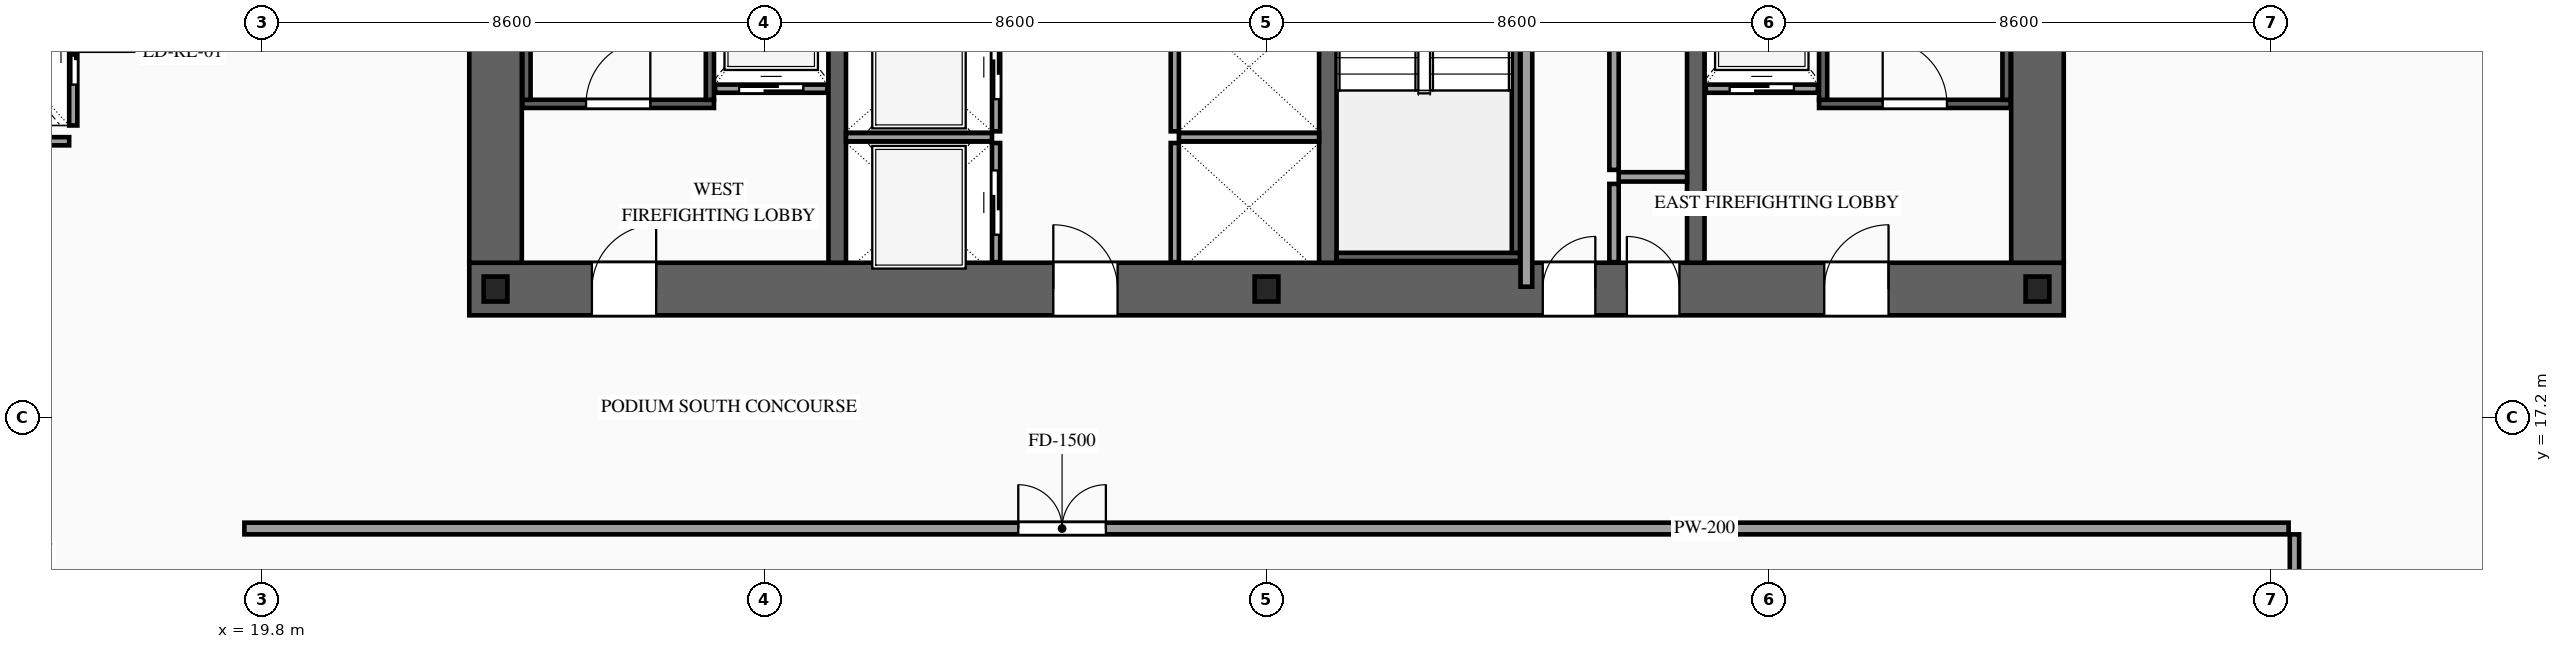
"""IFC4 building model, lengths in metres.
Left out: names, types, materials, properties, quantities, classifications, styles, units other than length and angle.
Written with IfcOpenShell. Run it as: python <this file> out.ifc"""

import sys

from ifc_helpers import new_model, si_unit, direction, frame, frame_2d, origin, origin_2d, place, context, subcontext, project, spatial, rectangle, i_section, extrude, source, transform, mapped, element, fill, save


model = new_model("IFC4")
c1 = context("Model", 3, precision=1e-05, world=origin(), true_north=direction((0.0, 1.0)))
c2 = subcontext(c1, "Body", "Model", "MODEL_VIEW")
j1 = project(units=[si_unit("LENGTHUNIT", "METRE"), si_unit("PLANEANGLEUNIT", "RADIAN")], contexts=[c1])
p1 = place(None, origin())
s1 = spatial("IfcSite", under=j1, at=p1, CompositionType="ELEMENT")
p2 = place(p1, origin())
s2 = spatial("IfcBuilding", under=s1, at=p2, CompositionType="ELEMENT")
p3 = place(p2, frame((0.0, 0.0, 19.8)))
s3 = spatial("IfcBuildingStorey", under=s2, at=p3, CompositionType="ELEMENT", Elevation=19.8)
p4 = place(p3, frame((23.35, 19.4, 0.0), z_axis=(0.0, 0.0, 1.0), x_axis=(1.0, 0.0, 0.0)))
e1 = element("IfcWall", 1, at=p4, inside=s3, PredefinedType="SHEAR", context=c2, shape_type="SweptSolid", body=[
    extrude(rectangle(XDim=27.3, YDim=0.9, at=frame_2d((13.65, 0.0))), origin(), (0.0, 0.0, 1.0), 6.0),
])
p5 = place(p4, frame((2.1, 0.0, 0.0)))
e2 = element("IfcOpeningElement", 2, at=p5, cuts=e1, PredefinedType="OPENING", context=c2, shape_type="SweptSolid", body=[
    extrude(rectangle(XDim=1.1, YDim=2.2, at=frame_2d((0.55, 1.1))), frame((0.0, 0.465, 0.0), z_axis=(0.0, -1.0, 0.0), x_axis=(1.0, 0.0, 0.0)), (0.0, 0.0, 1.0), 0.93),
])
p6 = place(p4, frame((10.0, 0.0, 0.0)))
e3 = element("IfcOpeningElement", 3, at=p6, cuts=e1, PredefinedType="OPENING", context=c2, shape_type="SweptSolid", body=[
    extrude(rectangle(XDim=1.1, YDim=2.2, at=frame_2d((0.55, 1.1))), frame((0.0, 0.465, 0.0), z_axis=(0.0, -1.0, 0.0), x_axis=(1.0, 0.0, 0.0)), (0.0, 0.0, 1.0), 0.93),
])
p7 = place(p4, frame((23.2, 0.0, 0.0)))
e4 = element("IfcOpeningElement", 4, at=p7, cuts=e1, PredefinedType="OPENING", context=c2, shape_type="SweptSolid", body=[
    extrude(rectangle(XDim=1.1, YDim=2.2, at=frame_2d((0.55, 1.1))), frame((0.0, 0.465, 0.0), z_axis=(0.0, -1.0, 0.0), x_axis=(1.0, 0.0, 0.0)), (0.0, 0.0, 1.0), 0.93),
])
p8 = place(p4, frame((19.82, 0.0, 0.0)))
e5 = element("IfcOpeningElement", 5, at=p8, cuts=e1, PredefinedType="OPENING", context=c2, shape_type="SweptSolid", body=[
    extrude(rectangle(XDim=0.9, YDim=2.15, at=frame_2d((0.45, 1.075))), frame((0.0, 0.465, 0.0), z_axis=(0.0, -1.0, 0.0), x_axis=(1.0, 0.0, 0.0)), (0.0, 0.0, 1.0), 0.93),
])
p9 = place(p4, frame((18.38, 0.0, 0.0)))
e6 = element("IfcOpeningElement", 6, at=p9, cuts=e1, PredefinedType="OPENING", context=c2, shape_type="SweptSolid", body=[
    extrude(rectangle(XDim=0.9, YDim=2.15, at=frame_2d((0.45, 1.075))), frame((0.0, 0.465, 0.0), z_axis=(0.0, -1.0, 0.0), x_axis=(1.0, 0.0, 0.0)), (0.0, 0.0, 1.0), 0.93),
])
m1 = source(origin(), c2, "Body", "SweptSolid", [
    extrude(rectangle(XDim=11.9, YDim=0.9, at=frame_2d((5.95, 0.0))), origin(), (0.0, 0.0, 1.0), 6.0),
])
for number, where, z_axis, x_axis in (
    (7, (23.8, 19.85, 0.0), (0.0, 0.0, 1.0), (0.0, 1.0, 0.0)),
    (8, (50.2, 19.85, 0.0), (0.0, 0.0, 1.0), (0.0, 1.0, 0.0)),
):
    element("IfcWall", number, at=place(p3, frame(where, z_axis=z_axis, x_axis=x_axis)), inside=s3, PredefinedType="SHEAR", context=c2, shape_type="MappedRepresentation", body=[
        mapped(m1, transform((0.0, 0.0, 0.0), scale=1.0)),
    ])
m2 = source(origin(), c2, "Body", "SweptSolid", [
    extrude(rectangle(XDim=11.9, YDim=0.3, at=frame_2d((5.95, 0.0))), origin(), (0.0, 0.0, 1.0), 6.0),
])
for number, where, z_axis, x_axis in (
    (9, (29.65, 19.85, 0.0), (0.0, 0.0, 1.0), (0.0, 1.0, 0.0)),
    (10, (38.05, 19.85, 0.0), (0.0, 0.0, 1.0), (0.0, 1.0, 0.0)),
    (11, (44.35, 19.85, 0.0), (0.0, 0.0, 1.0), (0.0, 1.0, 0.0)),
):
    element("IfcWall", number, at=place(p3, frame(where, z_axis=z_axis, x_axis=x_axis)), inside=s3, PredefinedType="SOLIDWALL", context=c2, shape_type="MappedRepresentation", body=[
        mapped(m2, transform((0.0, 0.0, 0.0), scale=1.0)),
    ])
m3 = source(origin(), c2, "Body", "SweptSolid", [
    extrude(i_section(OverallWidth=0.407, OverallDepth=0.428, WebThickness=0.02, FlangeThickness=0.035, at=origin_2d()), origin(), (0.0, 0.0, 1.0), 6.0),
])
for number, where, z_axis, x_axis in (
    (12, (23.8, 19.4, 0.0), (0.0, 0.0, 1.0), (1.0, 0.0, 0.0)),
    (13, (37.0, 19.4, 0.0), (0.0, 0.0, 1.0), (1.0, 0.0, 0.0)),
    (14, (50.2, 19.4, 0.0), (0.0, 0.0, 1.0), (1.0, 0.0, 0.0)),
):
    element("IfcColumn", number, at=place(p3, frame(where, z_axis=z_axis, x_axis=x_axis)), inside=s3, PredefinedType="COLUMN", context=c2, shape_type="MappedRepresentation", body=[
        mapped(m3, transform((0.0, 0.0, 0.0), scale=1.0)),
    ])
p10 = place(p3, frame((27.56, 22.83, 0.0), z_axis=(0.0, 0.0, 1.0), x_axis=(1.0, 0.0, 0.0)))
e15 = element("IfcWall", 15, at=p10, inside=s3, PredefinedType="SOLIDWALL", context=c2, shape_type="SweptSolid", body=[
    extrude(rectangle(XDim=1.92, YDim=0.14, at=frame_2d((0.96, 0.0))), origin(), (0.0, 0.0, 1.0), 5.68),
])
p11 = place(p10, frame((0.41, 0.0, 0.0)))
e16 = element("IfcOpeningElement", 16, at=p11, cuts=e15, PredefinedType="OPENING", context=c2, shape_type="SweptSolid", body=[
    extrude(rectangle(XDim=1.1, YDim=2.2, at=frame_2d((0.55, 1.1))), frame((0.0, 0.085, 0.0), z_axis=(0.0, -1.0, 0.0), x_axis=(1.0, 0.0, 0.0)), (0.0, 0.0, 1.0), 0.17),
])
p12 = place(p3, frame((44.52, 22.83, 0.0), z_axis=(0.0, 0.0, 1.0), x_axis=(1.0, 0.0, 0.0)))
e17 = element("IfcWall", 17, at=p12, inside=s3, PredefinedType="SOLIDWALL", context=c2, shape_type="SweptSolid", body=[
    extrude(rectangle(XDim=1.92, YDim=0.14, at=frame_2d((0.96, 0.0))), origin(), (0.0, 0.0, 1.0), 5.68),
])
p13 = place(p12, frame((0.41, 0.0, 0.0)))
e18 = element("IfcOpeningElement", 18, at=p13, cuts=e17, PredefinedType="OPENING", context=c2, shape_type="SweptSolid", body=[
    extrude(rectangle(XDim=1.1, YDim=2.2, at=frame_2d((0.55, 1.1))), frame((0.0, 0.085, 0.0), z_axis=(0.0, -1.0, 0.0), x_axis=(1.0, 0.0, 0.0)), (0.0, 0.0, 1.0), 0.17),
])
p14 = place(p3, frame((32.37, 19.86, 0.0), z_axis=(0.0, 0.0, 1.0), x_axis=(0.0, 1.0, 0.0)))
e19 = element("IfcWall", 19, at=p14, inside=s3, PredefinedType="SOLIDWALL", context=c2, shape_type="SweptSolid", body=[
    extrude(rectangle(XDim=2.04, YDim=0.14, at=frame_2d((1.02, 0.0))), origin(), (0.0, 0.0, 1.0), 5.68),
])
p15 = place(p14, frame((0.47, 0.0, 0.0)))
e20 = element("IfcOpeningElement", 20, at=p15, cuts=e19, PredefinedType="OPENING", context=c2, shape_type="SweptSolid", body=[
    extrude(rectangle(XDim=1.1, YDim=2.2, at=frame_2d((0.55, 1.1))), frame((0.0, 0.085, 0.0), z_axis=(0.0, -1.0, 0.0), x_axis=(1.0, 0.0, 0.0)), (0.0, 0.0, 1.0), 0.17),
])
m4 = source(origin(), c2, "Body", "SweptSolid", [
    extrude(rectangle(XDim=2.5, YDim=0.14, at=frame_2d((1.25, 0.0))), origin(), (0.0, 0.0, 1.0), 5.68),
])
p16 = place(p3, frame((29.8, 22.0, 0.0), z_axis=(0.0, 0.0, 1.0), x_axis=(1.0, 0.0, 0.0)))
e21 = element("IfcWall", 21, at=p16, inside=s3, PredefinedType="SOLIDWALL", context=c2, shape_type="MappedRepresentation", body=[
    mapped(m4, transform((0.0, 0.0, 0.0), scale=1.0)),
])
p17 = place(p3, frame((32.37, 22.1, 0.0), z_axis=(0.0, 0.0, 1.0), x_axis=(0.0, 1.0, 0.0)))
e22 = element("IfcWall", 22, at=p17, inside=s3, PredefinedType="SOLIDWALL", context=c2, shape_type="SweptSolid", body=[
    extrude(rectangle(XDim=2.2, YDim=0.14, at=frame_2d((1.1, 0.0))), origin(), (0.0, 0.0, 1.0), 5.68),
])
p18 = place(p17, frame((0.55, 0.0, 0.0)))
e23 = element("IfcOpeningElement", 23, at=p18, cuts=e22, PredefinedType="OPENING", context=c2, shape_type="SweptSolid", body=[
    extrude(rectangle(XDim=1.1, YDim=2.2, at=frame_2d((0.55, 1.1))), frame((0.0, 0.085, 0.0), z_axis=(0.0, -1.0, 0.0), x_axis=(1.0, 0.0, 0.0)), (0.0, 0.0, 1.0), 0.17),
])
m5 = source(origin(), c2, "Body", "SweptSolid", [
    extrude(rectangle(XDim=2.04, YDim=0.14, at=frame_2d((1.02, 0.0))), origin(), (0.0, 0.0, 1.0), 5.68),
])
p19 = place(p3, frame((35.43, 19.86, 0.0), z_axis=(0.0, 0.0, 1.0), x_axis=(0.0, 1.0, 0.0)))
e24 = element("IfcWall", 24, at=p19, inside=s3, PredefinedType="SOLIDWALL", context=c2, shape_type="MappedRepresentation", body=[
    mapped(m5, transform((0.0, 0.0, 0.0), scale=1.0)),
])
m6 = source(origin(), c2, "Body", "SweptSolid", [
    extrude(rectangle(XDim=2.4, YDim=0.14, at=frame_2d((1.2, 0.0))), origin(), (0.0, 0.0, 1.0), 5.68),
])
p20 = place(p3, frame((35.5, 22.0, 0.0), z_axis=(0.0, 0.0, 1.0), x_axis=(1.0, 0.0, 0.0)))
e25 = element("IfcWall", 25, at=p20, inside=s3, PredefinedType="SOLIDWALL", context=c2, shape_type="MappedRepresentation", body=[
    mapped(m6, transform((0.0, 0.0, 0.0), scale=1.0)),
])
m7 = source(origin(), c2, "Body", "SweptSolid", [
    extrude(rectangle(XDim=2.2, YDim=0.14, at=frame_2d((1.1, 0.0))), origin(), (0.0, 0.0, 1.0), 5.68),
])
p21 = place(p3, frame((35.43, 22.1, 0.0), z_axis=(0.0, 0.0, 1.0), x_axis=(0.0, 1.0, 0.0)))
e26 = element("IfcWall", 26, at=p21, inside=s3, PredefinedType="SOLIDWALL", context=c2, shape_type="MappedRepresentation", body=[
    mapped(m7, transform((0.0, 0.0, 0.0), scale=1.0)),
])
p22 = place(p3, frame((16.57, 22.2, 0.0), z_axis=(0.0, 0.0, 1.0), x_axis=(0.0, 1.0, 0.0)))
e27 = element("IfcWall", 27, at=p22, inside=s3, PredefinedType="SOLIDWALL", context=c2, shape_type="SweptSolid", body=[
    extrude(rectangle(XDim=2.5, YDim=0.14, at=frame_2d((1.25, 0.0))), origin(), (0.0, 0.0, 1.0), 5.68),
])
p23 = place(p22, frame((0.7, 0.0, 0.0)))
e28 = element("IfcOpeningElement", 28, at=p23, cuts=e27, PredefinedType="OPENING", context=c2, shape_type="SweptSolid", body=[
    extrude(rectangle(XDim=1.1, YDim=2.2, at=frame_2d((0.55, 1.1))), frame((0.0, 0.085, 0.0), z_axis=(0.0, -1.0, 0.0), x_axis=(1.0, 0.0, 0.0)), (0.0, 0.0, 1.0), 0.17),
])
m8 = source(origin(), c2, "Body", "SweptSolid", [
    extrude(rectangle(XDim=2.3, YDim=0.14, at=frame_2d((1.15, 0.0))), origin(), (0.0, 0.0, 1.0), 5.68),
])
p24 = place(p3, frame((14.2, 21.93, 0.0), z_axis=(0.0, 0.0, 1.0), x_axis=(1.0, 0.0, 0.0)))
e29 = element("IfcWall", 29, at=p24, inside=s3, PredefinedType="SOLIDWALL", context=c2, shape_type="MappedRepresentation", body=[
    mapped(m8, transform((0.0, 0.0, 0.0), scale=1.0)),
])
p25 = place(p3, frame((24.26, 22.57, 0.0), z_axis=(0.0, 0.0, 1.0), x_axis=(1.0, 0.0, 0.0)))
e30 = element("IfcWall", 30, at=p25, inside=s3, PredefinedType="SOLIDWALL", context=c2, shape_type="SweptSolid", body=[
    extrude(rectangle(XDim=3.28, YDim=0.14, at=frame_2d((1.64, 0.0))), origin(), (0.0, 0.0, 1.0), 5.68),
])
p26 = place(p25, frame((1.09, 0.0, 0.0)))
e31 = element("IfcOpeningElement", 31, at=p26, cuts=e30, PredefinedType="OPENING", context=c2, shape_type="SweptSolid", body=[
    extrude(rectangle(XDim=1.1, YDim=2.2, at=frame_2d((0.55, 1.1))), frame((0.0, 0.085, 0.0), z_axis=(0.0, -1.0, 0.0), x_axis=(1.0, 0.0, 0.0)), (0.0, 0.0, 1.0), 0.17),
])
m9 = source(origin(), c2, "Body", "SweptSolid", [
    extrude(rectangle(XDim=8.94, YDim=0.14, at=frame_2d((4.47, 0.0))), origin(), (0.0, 0.0, 1.0), 5.68),
])
for number, where, z_axis, x_axis in (
    (32, (24.33, 22.64, 0.0), (0.0, 0.0, 1.0), (0.0, 1.0, 0.0)),
    (33, (27.47, 22.64, 0.0), (0.0, 0.0, 1.0), (0.0, 1.0, 0.0)),
):
    element("IfcWall", number, at=place(p3, frame(where, z_axis=z_axis, x_axis=x_axis)), inside=s3, PredefinedType="SOLIDWALL", context=c2, shape_type="MappedRepresentation", body=[
        mapped(m9, transform((0.0, 0.0, 0.0), scale=1.0)),
    ])
p27 = place(p3, frame((46.46, 22.57, 0.0), z_axis=(0.0, 0.0, 1.0), x_axis=(1.0, 0.0, 0.0)))
e34 = element("IfcWall", 34, at=p27, inside=s3, PredefinedType="SOLIDWALL", context=c2, shape_type="SweptSolid", body=[
    extrude(rectangle(XDim=3.28, YDim=0.14, at=frame_2d((1.64, 0.0))), origin(), (0.0, 0.0, 1.0), 5.68),
])
p28 = place(p27, frame((1.09, 0.0, 0.0)))
e35 = element("IfcOpeningElement", 35, at=p28, cuts=e34, PredefinedType="OPENING", context=c2, shape_type="SweptSolid", body=[
    extrude(rectangle(XDim=1.1, YDim=2.2, at=frame_2d((0.55, 1.1))), frame((0.0, 0.085, 0.0), z_axis=(0.0, -1.0, 0.0), x_axis=(1.0, 0.0, 0.0)), (0.0, 0.0, 1.0), 0.17),
])
for number, where, z_axis, x_axis in (
    (36, (46.53, 22.64, 0.0), (0.0, 0.0, 1.0), (0.0, 1.0, 0.0)),
    (37, (49.67, 22.64, 0.0), (0.0, 0.0, 1.0), (0.0, 1.0, 0.0)),
):
    element("IfcWall", number, at=place(p3, frame(where, z_axis=z_axis, x_axis=x_axis)), inside=s3, PredefinedType="SOLIDWALL", context=c2, shape_type="MappedRepresentation", body=[
        mapped(m9, transform((0.0, 0.0, 0.0), scale=1.0)),
    ])
m10 = source(origin(), c2, "Body", "SweptSolid", [
    extrude(rectangle(XDim=3.14, YDim=0.14, at=frame_2d((1.57, 0.0))), origin(), (0.0, 0.0, 1.0), 5.68),
])
p29 = place(p3, frame((38.2, 19.95, 0.0), z_axis=(0.0, 0.0, 1.0), x_axis=(1.0, 0.0, 0.0)))
e38 = element("IfcWall", 38, at=p29, inside=s3, PredefinedType="SOLIDWALL", context=c2, shape_type="MappedRepresentation", body=[
    mapped(m10, transform((0.0, 0.0, 0.0), scale=1.0)),
])
m11 = source(origin(), c2, "Body", "SweptSolid", [
    extrude(rectangle(XDim=8.94, YDim=0.14, at=frame_2d((4.47, 0.0))), origin(), (0.0, 0.0, 1.0), 5.68),
])
p30 = place(p3, frame((41.27, 20.02, 0.0), z_axis=(0.0, 0.0, 1.0), x_axis=(0.0, 1.0, 0.0)))
e39 = element("IfcWall", 39, at=p30, inside=s3, PredefinedType="SOLIDWALL", context=c2, shape_type="MappedRepresentation", body=[
    mapped(m11, transform((0.0, 0.0, 0.0), scale=1.0)),
])
m12 = source(origin(), c2, "Body", "SweptSolid", [
    extrude(rectangle(XDim=1.34, YDim=0.16, at=frame_2d((0.67, 0.0))), origin(), (0.0, 0.0, 1.0), 5.68),
])
p31 = place(p3, frame((42.95, 19.86, 0.0), z_axis=(0.0, 0.0, 1.0), x_axis=(0.0, 1.0, 0.0)))
e40 = element("IfcWall", 40, at=p31, inside=s3, PredefinedType="PARTITIONING", context=c2, shape_type="MappedRepresentation", body=[
    mapped(m12, transform((0.0, 0.0, 0.0), scale=1.0)),
])
m13 = source(origin(), c2, "Body", "SweptSolid", [
    extrude(rectangle(XDim=1.17, YDim=0.16, at=frame_2d((0.585, 0.0))), origin(), (0.0, 0.0, 1.0), 5.68),
])
p32 = place(p3, frame((43.03, 21.32, 0.0), z_axis=(0.0, 0.0, 1.0), x_axis=(1.0, 0.0, 0.0)))
e41 = element("IfcWall", 41, at=p32, inside=s3, PredefinedType="PARTITIONING", context=c2, shape_type="MappedRepresentation", body=[
    mapped(m13, transform((0.0, 0.0, 0.0), scale=1.0)),
])
m14 = source(origin(), c2, "Body", "SweptSolid", [
    extrude(rectangle(XDim=12.72, YDim=0.2, at=frame_2d((6.36, 0.0))), origin(), (0.0, 0.0, 1.0), 5.68),
])
p33 = place(p3, frame((41.45, 19.44, 0.0), z_axis=(0.0, 0.0, 1.0), x_axis=(0.0, 1.0, 0.0)))
e42 = element("IfcWall", 42, at=p33, inside=s3, PredefinedType="PARTITIONING", context=c2, shape_type="MappedRepresentation", body=[
    mapped(m14, transform((0.0, 0.0, 0.0), scale=1.0)),
])
m15 = source(origin(), c2, "Body", "SweptSolid", [
    extrude(rectangle(XDim=10.72, YDim=0.16, at=frame_2d((5.36, 0.0))), origin(), (0.0, 0.0, 1.0), 5.68),
])
p34 = place(p3, frame((42.95, 21.44, 0.0), z_axis=(0.0, 0.0, 1.0), x_axis=(0.0, 1.0, 0.0)))
e43 = element("IfcWall", 43, at=p34, inside=s3, PredefinedType="PARTITIONING", context=c2, shape_type="MappedRepresentation", body=[
    mapped(m15, transform((0.0, 0.0, 0.0), scale=1.0)),
])
p35 = place(p3, frame((19.5, 15.3, 0.0), z_axis=(0.0, 0.0, 1.0), x_axis=(1.0, 0.0, 0.0)))
e44 = element("IfcWall", 44, at=p35, inside=s3, PredefinedType="PARTITIONING", context=c2, shape_type="SweptSolid", body=[
    extrude(rectangle(XDim=35.0, YDim=0.2, at=frame_2d((17.5, 0.0))), origin(), (0.0, 0.0, 1.0), 5.68),
])
p36 = place(p35, frame((13.25, 0.0, 0.0)))
e45 = element("IfcOpeningElement", 45, at=p36, cuts=e44, PredefinedType="OPENING", context=c2, shape_type="SweptSolid", body=[
    extrude(rectangle(XDim=1.5, YDim=2.3, at=frame_2d((0.75, 1.15))), frame((0.0, 0.115, 0.0), z_axis=(0.0, -1.0, 0.0), x_axis=(1.0, 0.0, 0.0)), (0.0, 0.0, 1.0), 0.23),
])
m16 = source(origin(), c2, "Body", "SweptSolid", [
    extrude(rectangle(XDim=13.22, YDim=0.16, at=frame_2d((6.61, 0.0))), origin(), (0.0, 0.0, 1.0), 5.68),
])
p37 = place(p3, frame((54.6, 1.98, 0.0), z_axis=(0.0, 0.0, 1.0), x_axis=(0.0, 1.0, 0.0)))
e46 = element("IfcWall", 46, at=p37, inside=s3, PredefinedType="PARTITIONING", context=c2, shape_type="MappedRepresentation", body=[
    mapped(m16, transform((0.0, 0.0, 0.0), scale=1.0)),
])
m17 = source(origin(), c2, "Body", "SweptSolid", [
    extrude(rectangle(XDim=1.1, YDim=2.2, at=frame_2d((0.55, 1.1))), frame((0.0, 0.025, 0.0), z_axis=(0.0, -1.0, 0.0), x_axis=(1.0, 0.0, 0.0)), (0.0, 0.0, 1.0), 0.05),
])
p38 = place(p11, origin())
e47 = element("IfcDoor", 47, at=p38, inside=s3, OperationType="SLIDING_TO_LEFT", PredefinedType="DOOR", context=c2, shape_type="MappedRepresentation", body=[
    mapped(m17, transform((0.0, 0.0, 0.0), scale=1.0)),
])
fill(e16, e47)
p39 = place(p13, origin())
e48 = element("IfcDoor", 48, at=p39, inside=s3, OperationType="SLIDING_TO_RIGHT", PredefinedType="DOOR", context=c2, shape_type="MappedRepresentation", body=[
    mapped(m17, transform((0.0, 0.0, 0.0), scale=1.0)),
])
fill(e18, e48)
p40 = place(p15, origin())
e49 = element("IfcDoor", 49, at=p40, inside=s3, OperationType="SLIDING_TO_LEFT", PredefinedType="DOOR", context=c2, shape_type="MappedRepresentation", body=[
    mapped(m17, transform((0.0, 0.0, 0.0), scale=1.0)),
])
fill(e20, e49)
p41 = place(p18, origin())
e50 = element("IfcDoor", 50, at=p41, inside=s3, OperationType="SLIDING_TO_RIGHT", PredefinedType="DOOR", context=c2, shape_type="MappedRepresentation", body=[
    mapped(m17, transform((0.0, 0.0, 0.0), scale=1.0)),
])
fill(e23, e50)
p42 = place(p23, origin())
e51 = element("IfcDoor", 51, at=p42, inside=s3, OperationType="SLIDING_TO_RIGHT", PredefinedType="DOOR", context=c2, shape_type="MappedRepresentation", body=[
    mapped(m17, transform((0.0, 0.0, 0.0), scale=1.0)),
])
fill(e28, e51)
m18 = source(origin(), c2, "Body", "SweptSolid", [
    extrude(rectangle(XDim=1.1, YDim=2.2, at=frame_2d((0.55, 1.1))), frame((0.0, 0.025, 0.0), z_axis=(0.0, -1.0, 0.0), x_axis=(1.0, 0.0, 0.0)), (0.0, 0.0, 1.0), 0.05),
])
p43 = place(p26, origin())
e52 = element("IfcDoor", 52, at=p43, inside=s3, OperationType="SINGLE_SWING_RIGHT", PredefinedType="DOOR", context=c2, shape_type="MappedRepresentation", body=[
    mapped(m18, transform((0.0, 0.0, 0.0), scale=1.0)),
])
fill(e31, e52)
p44 = place(p28, origin())
e53 = element("IfcDoor", 53, at=p44, inside=s3, OperationType="SINGLE_SWING_LEFT", PredefinedType="DOOR", context=c2, shape_type="MappedRepresentation", body=[
    mapped(m18, transform((0.0, 0.0, 0.0), scale=1.0)),
])
fill(e35, e53)
p45 = place(p5, origin())
e54 = element("IfcDoor", 54, at=p45, inside=s3, OperationType="SINGLE_SWING_RIGHT", PredefinedType="DOOR", context=c2, shape_type="MappedRepresentation", body=[
    mapped(m18, transform((0.0, 0.0, 0.0), scale=1.0)),
])
fill(e2, e54)
p46 = place(p6, origin())
e55 = element("IfcDoor", 55, at=p46, inside=s3, OperationType="SINGLE_SWING_LEFT", PredefinedType="DOOR", context=c2, shape_type="MappedRepresentation", body=[
    mapped(m18, transform((0.0, 0.0, 0.0), scale=1.0)),
])
fill(e3, e55)
p47 = place(p7, origin())
e56 = element("IfcDoor", 56, at=p47, inside=s3, OperationType="SINGLE_SWING_RIGHT", PredefinedType="DOOR", context=c2, shape_type="MappedRepresentation", body=[
    mapped(m18, transform((0.0, 0.0, 0.0), scale=1.0)),
])
fill(e4, e56)
m19 = source(origin(), c2, "Body", "SweptSolid", [
    extrude(rectangle(XDim=0.9, YDim=2.15, at=frame_2d((0.45, 1.075))), frame((0.0, 0.025, 0.0), z_axis=(0.0, -1.0, 0.0), x_axis=(1.0, 0.0, 0.0)), (0.0, 0.0, 1.0), 0.05),
])
p48 = place(p8, origin())
e57 = element("IfcDoor", 57, at=p48, inside=s3, OperationType="SINGLE_SWING_LEFT", PredefinedType="DOOR", context=c2, shape_type="MappedRepresentation", body=[
    mapped(m19, transform((0.0, 0.0, 0.0), scale=1.0)),
])
fill(e5, e57)
p49 = place(p9, origin())
e58 = element("IfcDoor", 58, at=p49, inside=s3, OperationType="SINGLE_SWING_RIGHT", PredefinedType="DOOR", context=c2, shape_type="MappedRepresentation", body=[
    mapped(m19, transform((0.0, 0.0, 0.0), scale=1.0)),
])
fill(e6, e58)
m20 = source(origin(), c2, "Body", "SweptSolid", [
    extrude(rectangle(XDim=1.5, YDim=2.3, at=frame_2d((0.75, 1.15))), frame((0.0, 0.025, 0.0), z_axis=(0.0, -1.0, 0.0), x_axis=(1.0, 0.0, 0.0)), (0.0, 0.0, 1.0), 0.05),
])
p50 = place(p36, origin())
e59 = element("IfcDoor", 59, at=p50, inside=s3, OperationType="DOUBLE_DOOR_SINGLE_SWING", PredefinedType="DOOR", context=c2, shape_type="MappedRepresentation", body=[
    mapped(m20, transform((0.0, 0.0, 0.0), scale=1.0)),
])
fill(e45, e59)
save(model, sys.argv[1])
